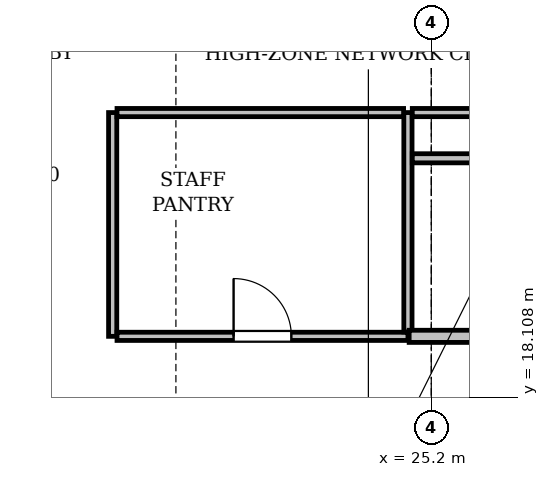
"""IFC4 building model, lengths in metres.
Left out: names, types, materials, properties, quantities, classifications, styles, units other than length and angle.
Written with IfcOpenShell. Run it as: python <this file> out.ifc"""

import sys

from ifc_helpers import new_model, si_unit, direction, frame, frame_2d, origin, place, context, subcontext, project, spatial, rectangle, extrude, element, fill, save


model = new_model("IFC4")
c1 = context("Model", 3, precision=1e-05, world=origin(), true_north=direction((0.0, 1.0)))
c2 = subcontext(c1, "Body", "Model", "MODEL_VIEW")
j1 = project(units=[si_unit("LENGTHUNIT", "METRE"), si_unit("PLANEANGLEUNIT", "RADIAN")], contexts=[c1])
p1 = place(None, origin())
s1 = spatial("IfcSite", under=j1, at=p1, CompositionType="ELEMENT")
p2 = place(p1, origin())
s2 = spatial("IfcBuilding", under=s1, at=p2, CompositionType="ELEMENT")
p3 = place(p2, frame((0.0, 0.0, 314.2)))
s3 = spatial("IfcBuildingStorey", under=s2, at=p3, CompositionType="ELEMENT", Elevation=314.2)
p4 = place(p3, frame((19.96, 22.79, 0.0), z_axis=(0.0, 0.0, 1.0), x_axis=(0.0, -1.0, 0.0)))
e1 = element("IfcWall", 1, at=p4, inside=s3, PredefinedType="PARTITIONING", context=c2, shape_type="SweptSolid", body=[
    extrude(rectangle(XDim=3.68, YDim=0.135, at=frame_2d((1.84, 0.0))), origin(), (0.0, 0.0, 1.0), 3.725),
])
p5 = place(p3, frame((20.031, 19.11, 0.0), z_axis=(0.0, 0.0, 1.0), x_axis=(1.0, 0.0, 0.0)))
e2 = element("IfcWall", 2, at=p5, inside=s3, PredefinedType="PARTITIONING", context=c2, shape_type="SweptSolid", body=[
    extrude(rectangle(XDim=4.784, YDim=0.135, at=frame_2d((2.392, 0.0))), origin(), (0.0, 0.0, 1.0), 3.421),
])
p6 = place(p5, frame((1.917, 0.0, 0.0)))
e3 = element("IfcOpeningElement", 3, at=p6, cuts=e2, PredefinedType="OPENING", context=c2, shape_type="SweptSolid", body=[
    extrude(rectangle(XDim=0.95, YDim=2.15, at=frame_2d((0.475, 1.075))), frame((0.0, 0.077, 0.0), z_axis=(0.0, -1.0, 0.0), x_axis=(1.0, 0.0, 0.0)), (0.0, 0.0, 1.0), 0.155),
])
p7 = place(p3, frame((24.816, 19.181, 0.0), z_axis=(0.0, 0.0, 1.0), x_axis=(0.0, 1.0, 0.0)))
e4 = element("IfcWall", 4, at=p7, inside=s3, PredefinedType="PARTITIONING", context=c2, shape_type="SweptSolid", body=[
    extrude(rectangle(XDim=3.609, YDim=0.135, at=frame_2d((1.804, 0.0))), origin(), (0.0, 0.0, 1.0), 3.725),
])
p8 = place(p3, frame((24.744, 22.79, 0.0), z_axis=(0.0, 0.0, 1.0), x_axis=(-1.0, 0.0, 0.0)))
e5 = element("IfcWall", 5, at=p8, inside=s3, PredefinedType="PARTITIONING", context=c2, shape_type="SweptSolid", body=[
    extrude(rectangle(XDim=4.713, YDim=0.135, at=frame_2d((2.356, 0.0))), origin(), (0.0, 0.0, 1.0), 3.421),
])
p9 = place(p3, frame((28.9, 22.79, 0.0), z_axis=(0.0, 0.0, 1.0), x_axis=(-1.0, 0.0, 0.0)))
e6 = element("IfcWall", 6, at=p9, inside=s3, PredefinedType="PARTITIONING", context=c2, shape_type="SweptSolid", body=[
    extrude(rectangle(XDim=4.012, YDim=0.2, at=frame_2d((2.006, 0.0))), origin(), (0.0, 0.0, 1.0), 3.319),
])
p10 = place(p9, frame((1.506, 0.0, 0.0)))
e7 = element("IfcOpeningElement", 7, at=p10, cuts=e6, PredefinedType="OPENING", context=c2, shape_type="SweptSolid", body=[
    extrude(rectangle(XDim=1.0, YDim=2.15, at=frame_2d((0.5, 1.075))), frame((0.0, 0.11, 0.0), z_axis=(0.0, -1.0, 0.0), x_axis=(1.0, 0.0, 0.0)), (0.0, 0.0, 1.0), 0.22),
])
p11 = place(p3, frame((24.836, 19.11, 0.0), z_axis=(0.0, 0.0, 1.0), x_axis=(1.0, 0.0, 0.0)))
e8 = element("IfcWall", 8, at=p11, inside=s3, PredefinedType="PARTITIONING", context=c2, shape_type="SweptSolid", body=[
    extrude(rectangle(XDim=3.964, YDim=0.2, at=frame_2d((1.982, 0.0))), origin(), (0.0, 0.0, 1.0), 3.319),
])
p12 = place(p6, origin())
e9 = element("IfcDoor", 9, at=p12, inside=s3, OperationType="SINGLE_SWING_RIGHT", PredefinedType="DOOR", context=c2, shape_type="SweptSolid", body=[
    extrude(rectangle(XDim=0.95, YDim=2.15, at=frame_2d((0.475, 1.075))), frame((0.0, 0.025, 0.0), z_axis=(0.0, -1.0, 0.0), x_axis=(1.0, 0.0, 0.0)), (0.0, 0.0, 1.0), 0.05),
])
fill(e3, e9)
save(model, sys.argv[1])
